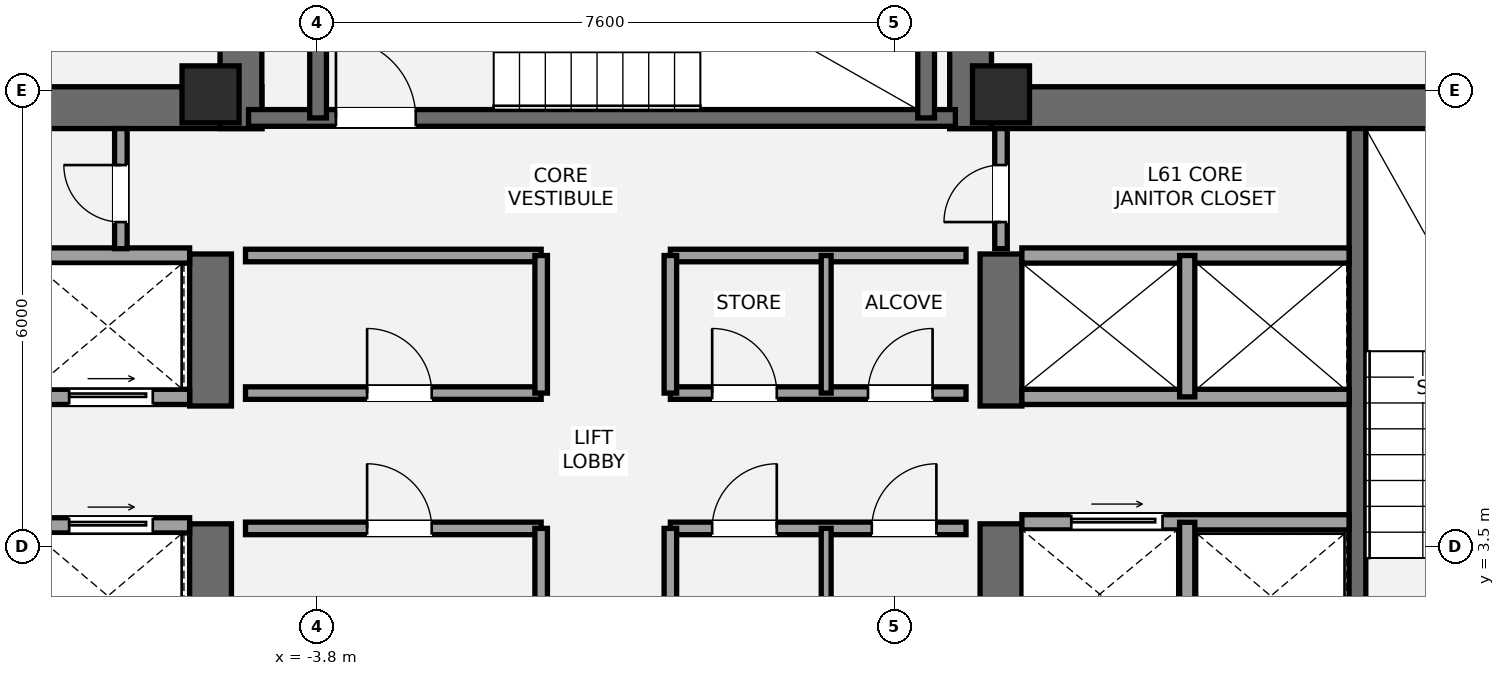
"""IFC4 building model, lengths in metres.
Left out: names, types, materials, properties, quantities, classifications, styles, units other than length and angle.
Written with IfcOpenShell. Run it as: python <this file> out.ifc"""

import sys

from ifc_helpers import new_model, si_unit, direction, frame, frame_2d, origin, origin_2d, place, context, subcontext, project, spatial, rectangle, extrude, element, fill, save


model = new_model("IFC4")
c1 = context("Model", 3, precision=1e-05, world=origin(), true_north=direction((0.0, 1.0)))
c2 = subcontext(c1, "Body", "Model", "MODEL_VIEW")
j1 = project(units=[si_unit("LENGTHUNIT", "METRE"), si_unit("PLANEANGLEUNIT", "RADIAN")], contexts=[c1])
p1 = place(None, origin())
s1 = spatial("IfcSite", under=j1, at=p1, CompositionType="ELEMENT")
p2 = place(p1, origin())
s2 = spatial("IfcBuilding", under=s1, at=p2, CompositionType="ELEMENT")
p3 = place(p2, frame((0.0, 0.0, 219.45)))
s3 = spatial("IfcBuildingStorey", under=s2, at=p3, CompositionType="ELEMENT", Elevation=219.45)
p4 = place(p3, frame((-13.7, 9.275, 0.0), z_axis=(0.0, 0.0, 1.0), x_axis=(1.0, 0.0, 0.0)))
e1 = element("IfcWall", 1, at=p4, inside=s3, PredefinedType="SHEAR", context=c2, shape_type="SweptSolid", body=[
    extrude(rectangle(XDim=9.175, YDim=0.55, at=frame_2d((4.587, 0.0))), origin(), (0.0, 0.0, 1.0), 3.15),
])
p5 = place(p3, frame((-5.2, 1.3, 0.0), z_axis=(0.0, 0.0, 1.0), x_axis=(0.0, 1.0, 0.0)))
e2 = element("IfcWall", 2, at=p5, inside=s3, PredefinedType="SHEAR", context=c2, shape_type="SweptSolid", body=[
    extrude(rectangle(XDim=2.5, YDim=0.55, at=frame_2d((1.25, 0.0))), origin(), (0.0, 0.0, 1.0), 3.15),
])
p6 = place(p3, frame((-5.2, 5.35, 0.0), z_axis=(0.0, 0.0, 1.0), x_axis=(0.0, 1.0, 0.0)))
e3 = element("IfcWall", 3, at=p6, inside=s3, PredefinedType="SHEAR", context=c2, shape_type="SweptSolid", body=[
    extrude(rectangle(XDim=2.0, YDim=0.55, at=frame_2d((1.0, 0.0))), origin(), (0.0, 0.0, 1.0), 3.15),
])
p7 = place(p3, frame((4.525, 9.275, 0.0), z_axis=(0.0, 0.0, 1.0), x_axis=(1.0, 0.0, 0.0)))
e4 = element("IfcWall", 4, at=p7, inside=s3, PredefinedType="SHEAR", context=c2, shape_type="SweptSolid", body=[
    extrude(rectangle(XDim=9.175, YDim=0.55, at=frame_2d((4.587, 0.0))), origin(), (0.0, 0.0, 1.0), 3.15),
])
p8 = place(p3, frame((5.2, 1.3, 0.0), z_axis=(0.0, 0.0, 1.0), x_axis=(0.0, 1.0, 0.0)))
e5 = element("IfcWall", 5, at=p8, inside=s3, PredefinedType="SHEAR", context=c2, shape_type="SweptSolid", body=[
    extrude(rectangle(XDim=2.5, YDim=0.55, at=frame_2d((1.25, 0.0))), origin(), (0.0, 0.0, 1.0), 3.15),
])
p9 = place(p3, frame((5.2, 5.35, 0.0), z_axis=(0.0, 0.0, 1.0), x_axis=(0.0, 1.0, 0.0)))
e6 = element("IfcWall", 6, at=p9, inside=s3, PredefinedType="SHEAR", context=c2, shape_type="SweptSolid", body=[
    extrude(rectangle(XDim=2.0, YDim=0.55, at=frame_2d((1.0, 0.0))), origin(), (0.0, 0.0, 1.0), 3.15),
])
p10 = place(p3, frame((9.89, 1.85, 0.0), z_axis=(0.0, 0.0, 1.0), x_axis=(0.0, 1.0, 0.0)))
e7 = element("IfcWall", 7, at=p10, inside=s3, PredefinedType="SHEAR", context=c2, shape_type="SweptSolid", body=[
    extrude(rectangle(XDim=7.15, YDim=0.22, at=frame_2d((3.575, 0.0))), origin(), (0.0, 0.0, 1.0), 3.15),
])
for number, where, z_axis, x_axis in (
    (8, (-4.8, 9.0, 0.0), (0.0, 0.0, 1.0), (0.0, 1.0, 0.0)),
    (9, (4.8, 9.0, 0.0), (0.0, 0.0, 1.0), (0.0, 1.0, 0.0)),
):
    element("IfcWall", number, at=place(p3, frame(where, z_axis=z_axis, x_axis=x_axis)), inside=s3, PredefinedType="SHEAR", context=c2, shape_type="SweptSolid", body=[
        extrude(rectangle(XDim=3.95, YDim=0.55, at=frame_2d((1.975, 0.0))), origin(), (0.0, 0.0, 1.0), 3.15),
    ])
p11 = place(p3, frame((-4.7, 9.14, 0.0), z_axis=(0.0, 0.0, 1.0), x_axis=(1.0, 0.0, 0.0)))
e10 = element("IfcWall", 10, at=p11, inside=s3, PredefinedType="SHEAR", context=c2, shape_type="SweptSolid", body=[
    extrude(rectangle(XDim=9.3, YDim=0.22, at=frame_2d((4.65, 0.0))), origin(), (0.0, 0.0, 1.0), 3.15),
])
p12 = place(p11, frame((1.15, 0.0, 0.0)))
e11 = element("IfcOpeningElement", 11, at=p12, cuts=e10, PredefinedType="OPENING", context=c2, shape_type="SweptSolid", body=[
    extrude(rectangle(XDim=1.05, YDim=2.15, at=frame_2d((0.525, 1.075))), frame((0.0, 0.12, 0.0), z_axis=(0.0, -1.0, 0.0), x_axis=(1.0, 0.0, 0.0)), (0.0, 0.0, 1.0), 0.24),
])
for number, where, z_axis, x_axis in (
    (12, (-3.785, 9.14, 0.0), (0.0, 0.0, 1.0), (0.0, 1.0, 0.0)),
    (13, (4.215, 9.14, 0.0), (0.0, 0.0, 1.0), (0.0, 1.0, 0.0)),
):
    element("IfcWall", number, at=place(p3, frame(where, z_axis=z_axis, x_axis=x_axis)), inside=s3, PredefinedType="SHEAR", context=c2, shape_type="SweptSolid", body=[
        extrude(rectangle(XDim=3.26, YDim=0.22, at=frame_2d((1.63, 0.0))), origin(), (0.0, 0.0, 1.0), 3.15),
    ])
for number, where, z_axis, x_axis in (
    (14, (-5.2, 9.45, 0.0), (0.0, 0.0, 1.0), (1.0, 0.0, 0.0)),
    (15, (5.2, 9.45, 0.0), (0.0, 0.0, 1.0), (1.0, 0.0, 0.0)),
):
    element("IfcColumn", number, at=place(p3, frame(where, z_axis=z_axis, x_axis=x_axis)), inside=s3, PredefinedType="PILASTER", context=c2, shape_type="SweptSolid", body=[
        extrude(rectangle(XDim=0.75, YDim=0.75, at=origin_2d()), origin(), (0.0, 0.0, 1.0), 3.15),
    ])
p13 = place(p3, frame((-9.78, 3.78, 0.0), z_axis=(0.0, 0.0, 1.0), x_axis=(1.0, 0.0, 0.0)))
e16 = element("IfcWall", 16, at=p13, inside=s3, PredefinedType="SOLIDWALL", context=c2, shape_type="SweptSolid", body=[
    extrude(rectangle(XDim=4.305, YDim=0.2, at=frame_2d((2.152, 0.0))), origin(), (0.0, 0.0, 1.0), 2.97),
])
p14 = place(p13, frame((2.72, 0.0, 0.0)))
e17 = element("IfcOpeningElement", 17, at=p14, cuts=e16, PredefinedType="OPENING", context=c2, shape_type="SweptSolid", body=[
    extrude(rectangle(XDim=1.1, YDim=2.2, at=frame_2d((0.55, 1.1))), frame((0.0, 0.11, 0.0), z_axis=(0.0, -1.0, 0.0), x_axis=(1.0, 0.0, 0.0)), (0.0, 0.0, 1.0), 0.22),
])
p15 = place(p3, frame((-9.78, 5.47, 0.0), z_axis=(0.0, 0.0, 1.0), x_axis=(1.0, 0.0, 0.0)))
e18 = element("IfcWall", 18, at=p15, inside=s3, PredefinedType="SOLIDWALL", context=c2, shape_type="SweptSolid", body=[
    extrude(rectangle(XDim=4.305, YDim=0.2, at=frame_2d((2.152, 0.0))), origin(), (0.0, 0.0, 1.0), 2.97),
])
p16 = place(p15, frame((0.55, 0.0, 0.0)))
e19 = element("IfcOpeningElement", 19, at=p16, cuts=e18, PredefinedType="OPENING", context=c2, shape_type="SweptSolid", body=[
    extrude(rectangle(XDim=1.1, YDim=2.2, at=frame_2d((0.55, 1.1))), frame((0.0, 0.11, 0.0), z_axis=(0.0, -1.0, 0.0), x_axis=(1.0, 0.0, 0.0)), (0.0, 0.0, 1.0), 0.22),
])
p17 = place(p15, frame((2.72, 0.0, 0.0)))
e20 = element("IfcOpeningElement", 20, at=p17, cuts=e18, PredefinedType="OPENING", context=c2, shape_type="SweptSolid", body=[
    extrude(rectangle(XDim=1.1, YDim=2.2, at=frame_2d((0.55, 1.1))), frame((0.0, 0.11, 0.0), z_axis=(0.0, -1.0, 0.0), x_axis=(1.0, 0.0, 0.0)), (0.0, 0.0, 1.0), 0.22),
])
p18 = place(p3, frame((-9.78, 7.33, 0.0), z_axis=(0.0, 0.0, 1.0), x_axis=(1.0, 0.0, 0.0)))
e21 = element("IfcWall", 21, at=p18, inside=s3, PredefinedType="SOLIDWALL", context=c2, shape_type="SweptSolid", body=[
    extrude(rectangle(XDim=4.305, YDim=0.2, at=frame_2d((2.152, 0.0))), origin(), (0.0, 0.0, 1.0), 2.97),
])
p19 = place(p3, frame((5.475, 3.82, 0.0), z_axis=(0.0, 0.0, 1.0), x_axis=(1.0, 0.0, 0.0)))
e22 = element("IfcWall", 22, at=p19, inside=s3, PredefinedType="SOLIDWALL", context=c2, shape_type="SweptSolid", body=[
    extrude(rectangle(XDim=4.305, YDim=0.2, at=frame_2d((2.152, 0.0))), origin(), (0.0, 0.0, 1.0), 2.97),
])
p20 = place(p19, frame((0.65, 0.0, 0.0)))
e23 = element("IfcOpeningElement", 23, at=p20, cuts=e22, PredefinedType="OPENING", context=c2, shape_type="SweptSolid", body=[
    extrude(rectangle(XDim=1.2, YDim=2.2, at=frame_2d((0.6, 1.1))), frame((0.0, 0.11, 0.0), z_axis=(0.0, -1.0, 0.0), x_axis=(1.0, 0.0, 0.0)), (0.0, 0.0, 1.0), 0.22),
])
p21 = place(p3, frame((7.65, 1.85, 0.0), z_axis=(0.0, 0.0, 1.0), x_axis=(0.0, 1.0, 0.0)))
e24 = element("IfcWall", 24, at=p21, inside=s3, PredefinedType="SOLIDWALL", context=c2, shape_type="SweptSolid", body=[
    extrude(rectangle(XDim=1.97, YDim=0.2, at=frame_2d((0.985, 0.0))), origin(), (0.0, 0.0, 1.0), 2.97),
])
for number, where, z_axis, x_axis in (
    (25, (5.475, 5.47, 0.0), (0.0, 0.0, 1.0), (1.0, 0.0, 0.0)),
    (26, (5.475, 7.33, 0.0), (0.0, 0.0, 1.0), (1.0, 0.0, 0.0)),
):
    element("IfcWall", number, at=place(p3, frame(where, z_axis=z_axis, x_axis=x_axis)), inside=s3, PredefinedType="SOLIDWALL", context=c2, shape_type="SweptSolid", body=[
        extrude(rectangle(XDim=4.305, YDim=0.2, at=frame_2d((2.152, 0.0))), origin(), (0.0, 0.0, 1.0), 2.97),
    ])
p22 = place(p3, frame((7.65, 5.47, 0.0), z_axis=(0.0, 0.0, 1.0), x_axis=(0.0, 1.0, 0.0)))
e27 = element("IfcWall", 27, at=p22, inside=s3, PredefinedType="SOLIDWALL", context=c2, shape_type="SweptSolid", body=[
    extrude(rectangle(XDim=1.86, YDim=0.2, at=frame_2d((0.93, 0.0))), origin(), (0.0, 0.0, 1.0), 2.97),
])
p23 = place(p3, frame((-4.74, 3.74, 0.0), z_axis=(0.0, 0.0, 1.0), x_axis=(1.0, 0.0, 0.0)))
e28 = element("IfcWall", 28, at=p23, inside=s3, PredefinedType="PARTITIONING", context=c2, shape_type="SweptSolid", body=[
    extrude(rectangle(XDim=3.89, YDim=0.165, at=frame_2d((1.945, 0.0))), origin(), (0.0, 0.0, 1.0), 2.97),
])
p24 = place(p23, frame((1.6, 0.0, 0.0)))
e29 = element("IfcOpeningElement", 29, at=p24, cuts=e28, PredefinedType="OPENING", context=c2, shape_type="SweptSolid", body=[
    extrude(rectangle(XDim=0.85, YDim=2.1, at=frame_2d((0.425, 1.05))), frame((0.0, 0.093, 0.0), z_axis=(0.0, -1.0, 0.0), x_axis=(1.0, 0.0, 0.0)), (0.0, 0.0, 1.0), 0.185),
])
p25 = place(p3, frame((-0.85, 1.92, 0.0), z_axis=(0.0, 0.0, 1.0), x_axis=(0.0, 1.0, 0.0)))
e30 = element("IfcWall", 30, at=p25, inside=s3, PredefinedType="PARTITIONING", context=c2, shape_type="SweptSolid", body=[
    extrude(rectangle(XDim=1.82, YDim=0.165, at=frame_2d((0.91, 0.0))), origin(), (0.0, 0.0, 1.0), 2.97),
])
p26 = place(p3, frame((0.85, 3.74, 0.0), z_axis=(0.0, 0.0, 1.0), x_axis=(1.0, 0.0, 0.0)))
e31 = element("IfcWall", 31, at=p26, inside=s3, PredefinedType="PARTITIONING", context=c2, shape_type="SweptSolid", body=[
    extrude(rectangle(XDim=3.89, YDim=0.165, at=frame_2d((1.945, 0.0))), origin(), (0.0, 0.0, 1.0), 2.97),
])
p27 = place(p26, frame((0.55, 0.0, 0.0)))
e32 = element("IfcOpeningElement", 32, at=p27, cuts=e31, PredefinedType="OPENING", context=c2, shape_type="SweptSolid", body=[
    extrude(rectangle(XDim=0.85, YDim=2.1, at=frame_2d((0.425, 1.05))), frame((0.0, 0.093, 0.0), z_axis=(0.0, -1.0, 0.0), x_axis=(1.0, 0.0, 0.0)), (0.0, 0.0, 1.0), 0.185),
])
p28 = place(p26, frame((2.65, 0.0, 0.0)))
e33 = element("IfcOpeningElement", 33, at=p28, cuts=e31, PredefinedType="OPENING", context=c2, shape_type="SweptSolid", body=[
    extrude(rectangle(XDim=0.85, YDim=2.1, at=frame_2d((0.425, 1.05))), frame((0.0, 0.093, 0.0), z_axis=(0.0, -1.0, 0.0), x_axis=(1.0, 0.0, 0.0)), (0.0, 0.0, 1.0), 0.185),
])
p29 = place(p3, frame((0.85, 1.92, 0.0), z_axis=(0.0, 0.0, 1.0), x_axis=(0.0, 1.0, 0.0)))
e34 = element("IfcWall", 34, at=p29, inside=s3, PredefinedType="PARTITIONING", context=c2, shape_type="SweptSolid", body=[
    extrude(rectangle(XDim=1.82, YDim=0.165, at=frame_2d((0.91, 0.0))), origin(), (0.0, 0.0, 1.0), 2.97),
])
p30 = place(p3, frame((2.9, 1.92, 0.0), z_axis=(0.0, 0.0, 1.0), x_axis=(0.0, 1.0, 0.0)))
e35 = element("IfcWall", 35, at=p30, inside=s3, PredefinedType="PARTITIONING", context=c2, shape_type="SweptSolid", body=[
    extrude(rectangle(XDim=1.82, YDim=0.13, at=frame_2d((0.91, 0.0))), origin(), (0.0, 0.0, 1.0), 2.97),
])
p31 = place(p3, frame((-4.74, 5.52, 0.0), z_axis=(0.0, 0.0, 1.0), x_axis=(1.0, 0.0, 0.0)))
e36 = element("IfcWall", 36, at=p31, inside=s3, PredefinedType="PARTITIONING", context=c2, shape_type="SweptSolid", body=[
    extrude(rectangle(XDim=3.89, YDim=0.165, at=frame_2d((1.945, 0.0))), origin(), (0.0, 0.0, 1.0), 2.97),
])
p32 = place(p31, frame((1.6, 0.0, 0.0)))
e37 = element("IfcOpeningElement", 37, at=p32, cuts=e36, PredefinedType="OPENING", context=c2, shape_type="SweptSolid", body=[
    extrude(rectangle(XDim=0.85, YDim=2.1, at=frame_2d((0.425, 1.05))), frame((0.0, 0.093, 0.0), z_axis=(0.0, -1.0, 0.0), x_axis=(1.0, 0.0, 0.0)), (0.0, 0.0, 1.0), 0.185),
])
p33 = place(p3, frame((-4.74, 7.33, 0.0), z_axis=(0.0, 0.0, 1.0), x_axis=(1.0, 0.0, 0.0)))
e38 = element("IfcWall", 38, at=p33, inside=s3, PredefinedType="PARTITIONING", context=c2, shape_type="SweptSolid", body=[
    extrude(rectangle(XDim=3.89, YDim=0.165, at=frame_2d((1.945, 0.0))), origin(), (0.0, 0.0, 1.0), 2.97),
])
p34 = place(p3, frame((-0.85, 5.52, 0.0), z_axis=(0.0, 0.0, 1.0), x_axis=(0.0, 1.0, 0.0)))
e39 = element("IfcWall", 39, at=p34, inside=s3, PredefinedType="PARTITIONING", context=c2, shape_type="SweptSolid", body=[
    extrude(rectangle(XDim=1.81, YDim=0.165, at=frame_2d((0.905, 0.0))), origin(), (0.0, 0.0, 1.0), 2.97),
])
p35 = place(p3, frame((0.85, 5.52, 0.0), z_axis=(0.0, 0.0, 1.0), x_axis=(1.0, 0.0, 0.0)))
e40 = element("IfcWall", 40, at=p35, inside=s3, PredefinedType="PARTITIONING", context=c2, shape_type="SweptSolid", body=[
    extrude(rectangle(XDim=3.89, YDim=0.165, at=frame_2d((1.945, 0.0))), origin(), (0.0, 0.0, 1.0), 2.97),
])
p36 = place(p35, frame((0.55, 0.0, 0.0)))
e41 = element("IfcOpeningElement", 41, at=p36, cuts=e40, PredefinedType="OPENING", context=c2, shape_type="SweptSolid", body=[
    extrude(rectangle(XDim=0.85, YDim=2.1, at=frame_2d((0.425, 1.05))), frame((0.0, 0.093, 0.0), z_axis=(0.0, -1.0, 0.0), x_axis=(1.0, 0.0, 0.0)), (0.0, 0.0, 1.0), 0.185),
])
p37 = place(p35, frame((2.6, 0.0, 0.0)))
e42 = element("IfcOpeningElement", 42, at=p37, cuts=e40, PredefinedType="OPENING", context=c2, shape_type="SweptSolid", body=[
    extrude(rectangle(XDim=0.85, YDim=2.1, at=frame_2d((0.425, 1.05))), frame((0.0, 0.093, 0.0), z_axis=(0.0, -1.0, 0.0), x_axis=(1.0, 0.0, 0.0)), (0.0, 0.0, 1.0), 0.185),
])
p38 = place(p3, frame((0.85, 7.33, 0.0), z_axis=(0.0, 0.0, 1.0), x_axis=(1.0, 0.0, 0.0)))
e43 = element("IfcWall", 43, at=p38, inside=s3, PredefinedType="PARTITIONING", context=c2, shape_type="SweptSolid", body=[
    extrude(rectangle(XDim=3.89, YDim=0.165, at=frame_2d((1.945, 0.0))), origin(), (0.0, 0.0, 1.0), 2.97),
])
p39 = place(p3, frame((0.85, 5.52, 0.0), z_axis=(0.0, 0.0, 1.0), x_axis=(0.0, 1.0, 0.0)))
e44 = element("IfcWall", 44, at=p39, inside=s3, PredefinedType="PARTITIONING", context=c2, shape_type="SweptSolid", body=[
    extrude(rectangle(XDim=1.81, YDim=0.165, at=frame_2d((0.905, 0.0))), origin(), (0.0, 0.0, 1.0), 2.97),
])
p40 = place(p3, frame((2.9, 5.52, 0.0), z_axis=(0.0, 0.0, 1.0), x_axis=(0.0, 1.0, 0.0)))
e45 = element("IfcWall", 45, at=p40, inside=s3, PredefinedType="PARTITIONING", context=c2, shape_type="SweptSolid", body=[
    extrude(rectangle(XDim=1.81, YDim=0.13, at=frame_2d((0.905, 0.0))), origin(), (0.0, 0.0, 1.0), 2.97),
])
p41 = place(p3, frame((-6.38, 7.42, 0.0), z_axis=(0.0, 0.0, 1.0), x_axis=(0.0, 1.0, 0.0)))
e46 = element("IfcWall", 46, at=p41, inside=s3, PredefinedType="PARTITIONING", context=c2, shape_type="SweptSolid", body=[
    extrude(rectangle(XDim=1.58, YDim=0.165, at=frame_2d((0.79, 0.0))), origin(), (0.0, 0.0, 1.0), 2.97),
])
p42 = place(p41, frame((0.35, 0.0, 0.0)))
e47 = element("IfcOpeningElement", 47, at=p42, cuts=e46, PredefinedType="OPENING", context=c2, shape_type="SweptSolid", body=[
    extrude(rectangle(XDim=0.75, YDim=2.1, at=frame_2d((0.375, 1.05))), frame((0.0, 0.093, 0.0), z_axis=(0.0, -1.0, 0.0), x_axis=(1.0, 0.0, 0.0)), (0.0, 0.0, 1.0), 0.185),
])
p43 = place(p3, frame((5.2, 7.42, 0.0), z_axis=(0.0, 0.0, 1.0), x_axis=(0.0, 1.0, 0.0)))
e48 = element("IfcWall", 48, at=p43, inside=s3, PredefinedType="PARTITIONING", context=c2, shape_type="SweptSolid", body=[
    extrude(rectangle(XDim=1.58, YDim=0.165, at=frame_2d((0.79, 0.0))), origin(), (0.0, 0.0, 1.0), 2.97),
])
p44 = place(p43, frame((0.35, 0.0, 0.0)))
e49 = element("IfcOpeningElement", 49, at=p44, cuts=e48, PredefinedType="OPENING", context=c2, shape_type="SweptSolid", body=[
    extrude(rectangle(XDim=0.75, YDim=2.1, at=frame_2d((0.375, 1.05))), frame((0.0, 0.093, 0.0), z_axis=(0.0, -1.0, 0.0), x_axis=(1.0, 0.0, 0.0)), (0.0, 0.0, 1.0), 0.185),
])
p45 = place(p12, origin())
e50 = element("IfcDoor", 50, at=p45, inside=s3, OperationType="SINGLE_SWING_LEFT", PredefinedType="DOOR", context=c2, shape_type="SweptSolid", body=[
    extrude(rectangle(XDim=1.05, YDim=2.15, at=frame_2d((0.525, 1.075))), frame((0.0, 0.025, 0.0), z_axis=(0.0, -1.0, 0.0), x_axis=(1.0, 0.0, 0.0)), (0.0, 0.0, 1.0), 0.05),
])
fill(e11, e50)
p46 = place(p17, origin())
e51 = element("IfcDoor", 51, at=p46, inside=s3, OperationType="SLIDING_TO_LEFT", PredefinedType="DOOR", context=c2, shape_type="SweptSolid", body=[
    extrude(rectangle(XDim=1.1, YDim=2.2, at=frame_2d((0.55, 1.1))), frame((0.0, 0.025, 0.0), z_axis=(0.0, -1.0, 0.0), x_axis=(1.0, 0.0, 0.0)), (0.0, 0.0, 1.0), 0.05),
])
fill(e20, e51)
p47 = place(p14, origin())
e52 = element("IfcDoor", 52, at=p47, inside=s3, OperationType="SLIDING_TO_LEFT", PredefinedType="DOOR", context=c2, shape_type="SweptSolid", body=[
    extrude(rectangle(XDim=1.1, YDim=2.2, at=frame_2d((0.55, 1.1))), frame((0.0, 0.025, 0.0), z_axis=(0.0, -1.0, 0.0), x_axis=(1.0, 0.0, 0.0)), (0.0, 0.0, 1.0), 0.05),
])
fill(e17, e52)
p48 = place(p20, origin())
e53 = element("IfcDoor", 53, at=p48, inside=s3, OperationType="SLIDING_TO_RIGHT", PredefinedType="DOOR", context=c2, shape_type="SweptSolid", body=[
    extrude(rectangle(XDim=1.2, YDim=2.2, at=frame_2d((0.6, 1.1))), frame((0.0, 0.025, 0.0), z_axis=(0.0, -1.0, 0.0), x_axis=(1.0, 0.0, 0.0)), (0.0, 0.0, 1.0), 0.05),
])
fill(e23, e53)
p49 = place(p24, origin())
e54 = element("IfcDoor", 54, at=p49, inside=s3, OperationType="SINGLE_SWING_LEFT", PredefinedType="DOOR", context=c2, shape_type="SweptSolid", body=[
    extrude(rectangle(XDim=0.85, YDim=2.1, at=frame_2d((0.425, 1.05))), frame((0.0, 0.025, 0.0), z_axis=(0.0, -1.0, 0.0), x_axis=(1.0, 0.0, 0.0)), (0.0, 0.0, 1.0), 0.05),
])
fill(e29, e54)
p50 = place(p27, origin())
e55 = element("IfcDoor", 55, at=p50, inside=s3, OperationType="SINGLE_SWING_RIGHT", PredefinedType="DOOR", context=c2, shape_type="SweptSolid", body=[
    extrude(rectangle(XDim=0.85, YDim=2.1, at=frame_2d((0.425, 1.05))), frame((0.0, 0.025, 0.0), z_axis=(0.0, -1.0, 0.0), x_axis=(1.0, 0.0, 0.0)), (0.0, 0.0, 1.0), 0.05),
])
fill(e32, e55)
p51 = place(p28, origin())
e56 = element("IfcDoor", 56, at=p51, inside=s3, OperationType="SINGLE_SWING_RIGHT", PredefinedType="DOOR", context=c2, shape_type="SweptSolid", body=[
    extrude(rectangle(XDim=0.85, YDim=2.1, at=frame_2d((0.425, 1.05))), frame((0.0, 0.025, 0.0), z_axis=(0.0, -1.0, 0.0), x_axis=(1.0, 0.0, 0.0)), (0.0, 0.0, 1.0), 0.05),
])
fill(e33, e56)
p52 = place(p32, origin())
e57 = element("IfcDoor", 57, at=p52, inside=s3, OperationType="SINGLE_SWING_LEFT", PredefinedType="DOOR", context=c2, shape_type="SweptSolid", body=[
    extrude(rectangle(XDim=0.85, YDim=2.1, at=frame_2d((0.425, 1.05))), frame((0.0, 0.025, 0.0), z_axis=(0.0, -1.0, 0.0), x_axis=(1.0, 0.0, 0.0)), (0.0, 0.0, 1.0), 0.05),
])
fill(e37, e57)
p53 = place(p36, origin())
e58 = element("IfcDoor", 58, at=p53, inside=s3, OperationType="SINGLE_SWING_LEFT", PredefinedType="DOOR", context=c2, shape_type="SweptSolid", body=[
    extrude(rectangle(XDim=0.85, YDim=2.1, at=frame_2d((0.425, 1.05))), frame((0.0, 0.025, 0.0), z_axis=(0.0, -1.0, 0.0), x_axis=(1.0, 0.0, 0.0)), (0.0, 0.0, 1.0), 0.05),
])
fill(e41, e58)
p54 = place(p37, origin())
e59 = element("IfcDoor", 59, at=p54, inside=s3, OperationType="SINGLE_SWING_RIGHT", PredefinedType="DOOR", context=c2, shape_type="SweptSolid", body=[
    extrude(rectangle(XDim=0.85, YDim=2.1, at=frame_2d((0.425, 1.05))), frame((0.0, 0.025, 0.0), z_axis=(0.0, -1.0, 0.0), x_axis=(1.0, 0.0, 0.0)), (0.0, 0.0, 1.0), 0.05),
])
fill(e42, e59)
p55 = place(p42, origin())
e60 = element("IfcDoor", 60, at=p55, inside=s3, OperationType="SINGLE_SWING_RIGHT", PredefinedType="DOOR", context=c2, shape_type="SweptSolid", body=[
    extrude(rectangle(XDim=0.75, YDim=2.1, at=frame_2d((0.375, 1.05))), frame((0.0, 0.025, 0.0), z_axis=(0.0, -1.0, 0.0), x_axis=(1.0, 0.0, 0.0)), (0.0, 0.0, 1.0), 0.05),
])
fill(e47, e60)
p56 = place(p44, origin())
e61 = element("IfcDoor", 61, at=p56, inside=s3, OperationType="SINGLE_SWING_LEFT", PredefinedType="DOOR", context=c2, shape_type="SweptSolid", body=[
    extrude(rectangle(XDim=0.75, YDim=2.1, at=frame_2d((0.375, 1.05))), frame((0.0, 0.025, 0.0), z_axis=(0.0, -1.0, 0.0), x_axis=(1.0, 0.0, 0.0)), (0.0, 0.0, 1.0), 0.05),
])
fill(e49, e61)
save(model, sys.argv[1])
